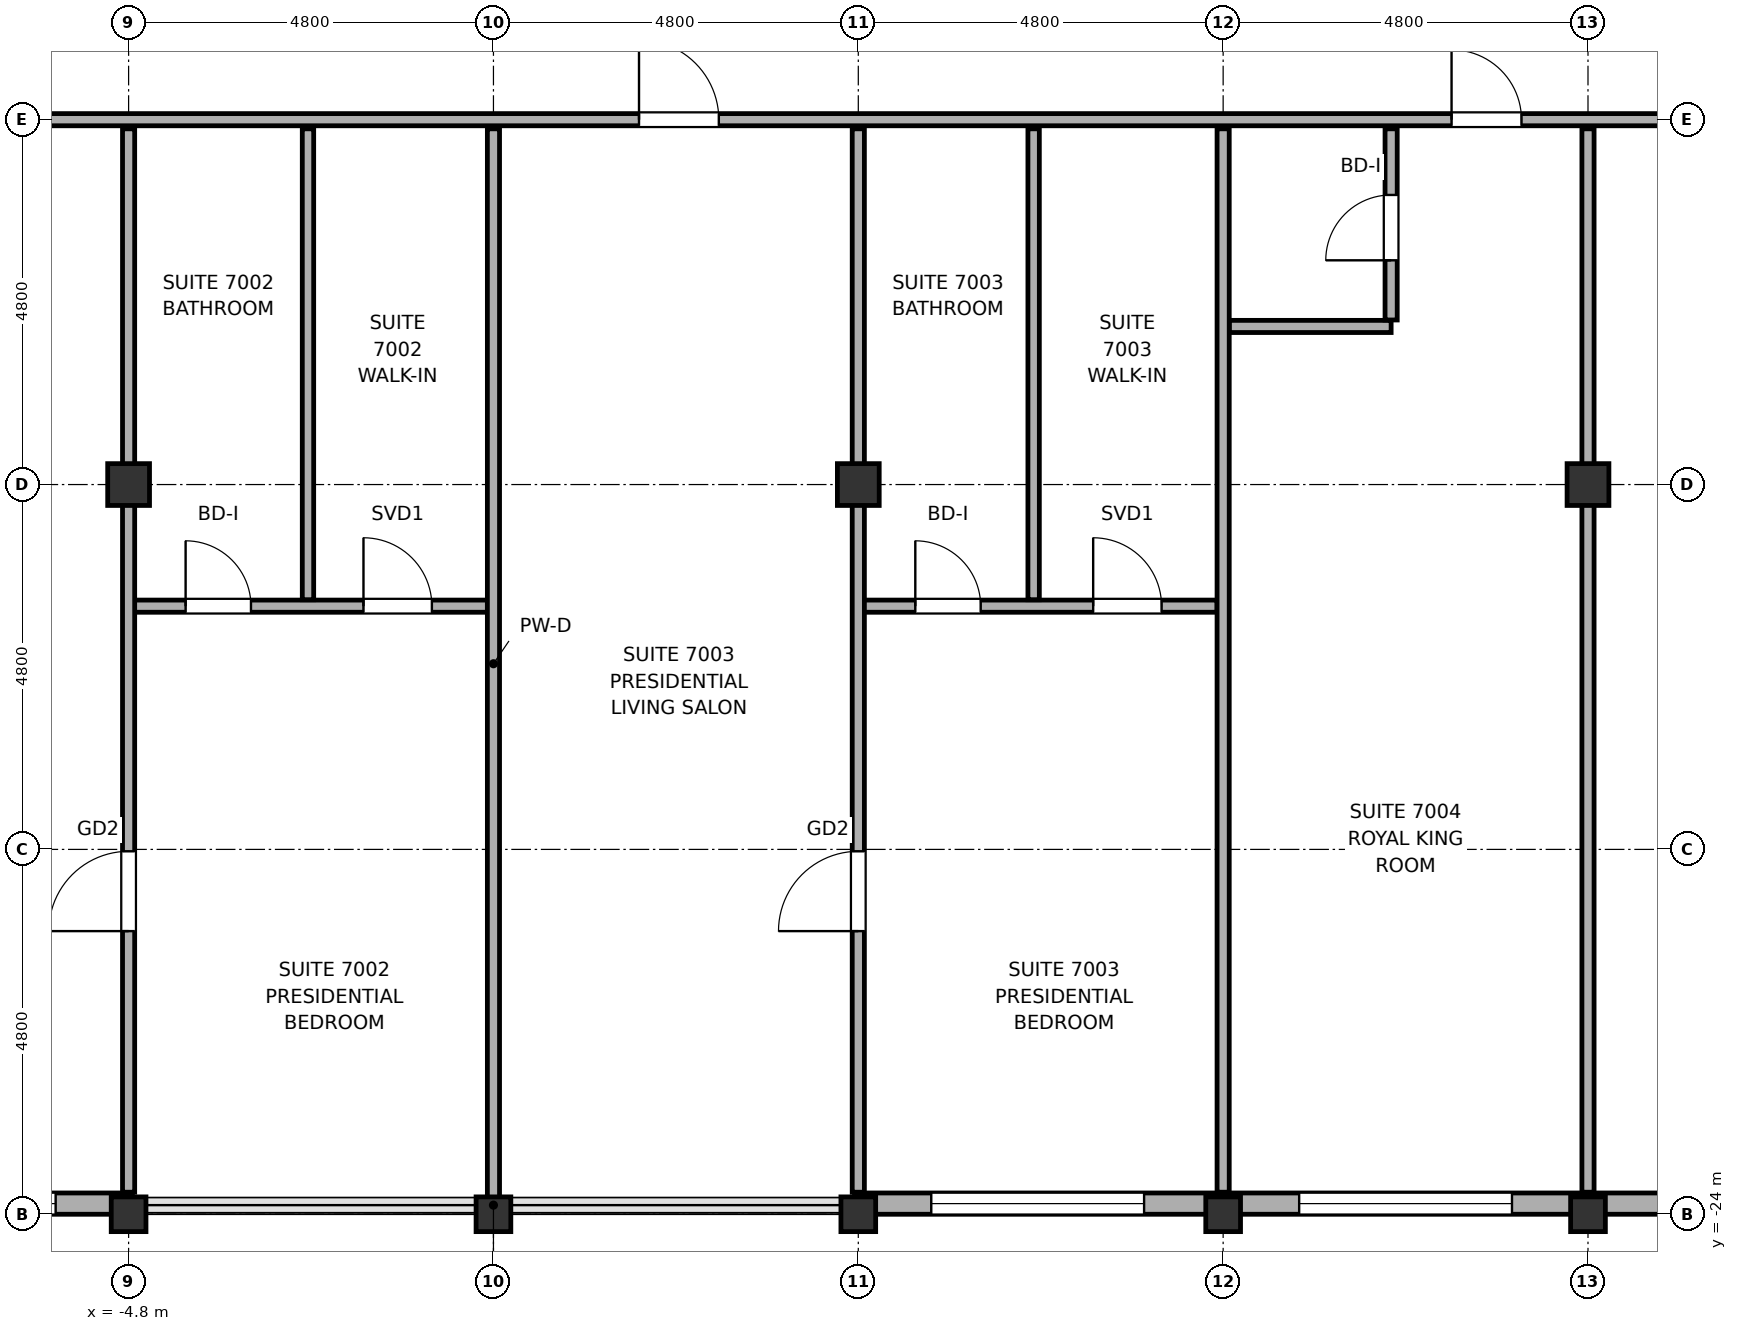
"""IFC4 building model, lengths in metres.
Left out: names, types, materials, properties, quantities, classifications, styles, units other than length and angle.
Written with IfcOpenShell. Run it as: python <this file> out.ifc"""

import sys

from ifc_helpers import new_model, si_unit, direction, frame, frame_2d, origin, origin_2d, place, context, subcontext, project, spatial, rectangle, hollow_rectangle, hollow_circle, extrude, element, fill, save


model = new_model("IFC4")
c1 = context("Model", 3, precision=1e-05, world=origin(), true_north=direction((0.0, 1.0)))
c2 = subcontext(c1, "Body", "Model", "MODEL_VIEW")
j1 = project(units=[si_unit("LENGTHUNIT", "METRE"), si_unit("PLANEANGLEUNIT", "RADIAN")], contexts=[c1])
p1 = place(None, origin())
s1 = spatial("IfcSite", under=j1, at=p1, CompositionType="ELEMENT")
p2 = place(p1, origin())
s2 = spatial("IfcBuilding", under=s1, at=p2, CompositionType="ELEMENT")
p3 = place(p2, frame((0.0, 0.0, 282.2)))
s3 = spatial("IfcBuildingStorey", under=s2, at=p3, CompositionType="ELEMENT", Elevation=282.2)
p4 = place(p3, frame((-4.8, -24.0, -0.2), z_axis=(0.0, 0.0, 1.0), x_axis=(1.0, 0.0, 0.0)))
e1 = element("IfcColumn", 1, at=p4, inside=s3, PredefinedType="COLUMN", context=c2, shape_type="SweptSolid", body=[
    extrude(hollow_circle(Radius=0.229, WallThickness=0.02, at=origin_2d()), origin(), (0.0, 0.0, 1.0), 4.4),
])
p5 = place(p3, frame((-4.8, -14.4, 0.0), z_axis=(0.0, 0.0, 1.0), x_axis=(1.0, 0.0, 0.0)))
e2 = element("IfcColumn", 2, at=p5, inside=s3, PredefinedType="COLUMN", context=c2, shape_type="SweptSolid", body=[
    extrude(hollow_rectangle(XDim=0.55, YDim=0.55, WallThickness=0.025, at=origin_2d()), origin(), (0.0, 0.0, 1.0), 4.2),
])
for number, where, z_axis, x_axis in (
    (3, (0.0, -24.0, -0.2), (0.0, 0.0, 1.0), (1.0, 0.0, 0.0)),
    (4, (4.8, -24.0, -0.2), (0.0, 0.0, 1.0), (1.0, 0.0, 0.0)),
):
    element("IfcColumn", number, at=place(p3, frame(where, z_axis=z_axis, x_axis=x_axis)), inside=s3, PredefinedType="COLUMN", context=c2, shape_type="SweptSolid", body=[
        extrude(hollow_circle(Radius=0.229, WallThickness=0.02, at=origin_2d()), origin(), (0.0, 0.0, 1.0), 4.4),
    ])
p6 = place(p3, frame((4.8, -14.4, 0.0), z_axis=(0.0, 0.0, 1.0), x_axis=(1.0, 0.0, 0.0)))
e5 = element("IfcColumn", 5, at=p6, inside=s3, PredefinedType="COLUMN", context=c2, shape_type="SweptSolid", body=[
    extrude(hollow_rectangle(XDim=0.55, YDim=0.55, WallThickness=0.025, at=origin_2d()), origin(), (0.0, 0.0, 1.0), 4.2),
])
for number, where, z_axis, x_axis in (
    (6, (9.6, -24.0, -0.2), (0.0, 0.0, 1.0), (1.0, 0.0, 0.0)),
    (7, (14.4, -24.0, -0.2), (0.0, 0.0, 1.0), (1.0, 0.0, 0.0)),
):
    element("IfcColumn", number, at=place(p3, frame(where, z_axis=z_axis, x_axis=x_axis)), inside=s3, PredefinedType="COLUMN", context=c2, shape_type="SweptSolid", body=[
        extrude(hollow_circle(Radius=0.229, WallThickness=0.02, at=origin_2d()), origin(), (0.0, 0.0, 1.0), 4.4),
    ])
p7 = place(p3, frame((14.4, -14.4, 0.0), z_axis=(0.0, 0.0, 1.0), x_axis=(1.0, 0.0, 0.0)))
e8 = element("IfcColumn", 8, at=p7, inside=s3, PredefinedType="COLUMN", context=c2, shape_type="SweptSolid", body=[
    extrude(hollow_rectangle(XDim=0.55, YDim=0.55, WallThickness=0.025, at=origin_2d()), origin(), (0.0, 0.0, 1.0), 4.2),
])
p8 = place(p3, frame((-25.2, -23.86, 0.0), z_axis=(0.0, 0.0, 1.0), x_axis=(1.0, 0.0, 0.0)))
e9 = element("IfcWall", 9, at=p8, inside=s3, PredefinedType="SOLIDWALL", context=c2, shape_type="SweptSolid", body=[
    extrude(rectangle(XDim=20.45, YDim=0.28, at=frame_2d((10.225, 0.0))), origin(), (0.0, 0.0, 1.0), 2.6),
])
p9 = place(p8, frame((7.04, 0.0, 0.75)))
e10 = element("IfcOpeningElement", 10, at=p9, cuts=e9, PredefinedType="OPENING", context=c2, shape_type="SweptSolid", body=[
    extrude(rectangle(XDim=2.8, YDim=1.7, at=frame_2d((1.4, 0.85))), frame((0.0, 0.155, 0.0), z_axis=(0.0, -1.0, 0.0), x_axis=(1.0, 0.0, 0.0)), (0.0, 0.0, 1.0), 0.31),
])
p10 = place(p8, frame((11.76, 0.0, 0.75)))
e11 = element("IfcOpeningElement", 11, at=p10, cuts=e9, PredefinedType="OPENING", context=c2, shape_type="SweptSolid", body=[
    extrude(rectangle(XDim=2.8, YDim=1.7, at=frame_2d((1.4, 0.85))), frame((0.0, 0.155, 0.0), z_axis=(0.0, -1.0, 0.0), x_axis=(1.0, 0.0, 0.0)), (0.0, 0.0, 1.0), 0.31),
])
p11 = place(p8, frame((16.64, 0.0, 0.75)))
e12 = element("IfcOpeningElement", 12, at=p11, cuts=e9, PredefinedType="OPENING", context=c2, shape_type="SweptSolid", body=[
    extrude(rectangle(XDim=2.8, YDim=1.7, at=frame_2d((1.4, 0.85))), frame((0.0, 0.155, 0.0), z_axis=(0.0, -1.0, 0.0), x_axis=(1.0, 0.0, 0.0)), (0.0, 0.0, 1.0), 0.31),
])
p12 = place(p3, frame((4.75, -23.86, 0.0), z_axis=(0.0, 0.0, 1.0), x_axis=(1.0, 0.0, 0.0)))
e13 = element("IfcWall", 13, at=p12, inside=s3, PredefinedType="SOLIDWALL", context=c2, shape_type="SweptSolid", body=[
    extrude(rectangle(XDim=15.65, YDim=0.28, at=frame_2d((7.825, 0.0))), origin(), (0.0, 0.0, 1.0), 2.6),
])
p13 = place(p12, frame((1.01, 0.0, 0.75)))
e14 = element("IfcOpeningElement", 14, at=p13, cuts=e13, PredefinedType="OPENING", context=c2, shape_type="SweptSolid", body=[
    extrude(rectangle(XDim=2.8, YDim=1.7, at=frame_2d((1.4, 0.85))), frame((0.0, 0.155, 0.0), z_axis=(0.0, -1.0, 0.0), x_axis=(1.0, 0.0, 0.0)), (0.0, 0.0, 1.0), 0.31),
])
p14 = place(p12, frame((5.85, 0.0, 0.75)))
e15 = element("IfcOpeningElement", 15, at=p14, cuts=e13, PredefinedType="OPENING", context=c2, shape_type="SweptSolid", body=[
    extrude(rectangle(XDim=2.8, YDim=1.7, at=frame_2d((1.4, 0.85))), frame((0.0, 0.155, 0.0), z_axis=(0.0, -1.0, 0.0), x_axis=(1.0, 0.0, 0.0)), (0.0, 0.0, 1.0), 0.31),
])
p15 = place(p3, frame((-4.8, -16.0, 0.0), z_axis=(0.0, 0.0, 1.0), x_axis=(1.0, 0.0, 0.0)))
e16 = element("IfcWall", 16, at=p15, inside=s3, PredefinedType="PARTITIONING", context=c2, shape_type="SweptSolid", body=[
    extrude(rectangle(XDim=4.72, YDim=0.16, at=frame_2d((2.36, 0.0))), origin(), (0.0, 0.0, 1.0), 3.56),
])
p16 = place(p15, frame((0.75, 0.0, 0.0)))
e17 = element("IfcOpeningElement", 17, at=p16, cuts=e16, PredefinedType="OPENING", context=c2, shape_type="SweptSolid", body=[
    extrude(rectangle(XDim=0.86, YDim=2.1, at=frame_2d((0.43, 1.05))), frame((0.0, 0.095, 0.0), z_axis=(0.0, -1.0, 0.0), x_axis=(1.0, 0.0, 0.0)), (0.0, 0.0, 1.0), 0.19),
])
p17 = place(p15, frame((3.09, 0.0, 0.0)))
e18 = element("IfcOpeningElement", 18, at=p17, cuts=e16, PredefinedType="OPENING", context=c2, shape_type="SweptSolid", body=[
    extrude(rectangle(XDim=0.9, YDim=2.1, at=frame_2d((0.45, 1.05))), frame((0.0, 0.095, 0.0), z_axis=(0.0, -1.0, 0.0), x_axis=(1.0, 0.0, 0.0)), (0.0, 0.0, 1.0), 0.19),
])
p18 = place(p3, frame((4.8, -16.0, 0.0), z_axis=(0.0, 0.0, 1.0), x_axis=(1.0, 0.0, 0.0)))
e19 = element("IfcWall", 19, at=p18, inside=s3, PredefinedType="PARTITIONING", context=c2, shape_type="SweptSolid", body=[
    extrude(rectangle(XDim=4.72, YDim=0.16, at=frame_2d((2.36, 0.0))), origin(), (0.0, 0.0, 1.0), 3.56),
])
p19 = place(p18, frame((0.75, 0.0, 0.0)))
e20 = element("IfcOpeningElement", 20, at=p19, cuts=e19, PredefinedType="OPENING", context=c2, shape_type="SweptSolid", body=[
    extrude(rectangle(XDim=0.86, YDim=2.1, at=frame_2d((0.43, 1.05))), frame((0.0, 0.095, 0.0), z_axis=(0.0, -1.0, 0.0), x_axis=(1.0, 0.0, 0.0)), (0.0, 0.0, 1.0), 0.19),
])
p20 = place(p18, frame((3.09, 0.0, 0.0)))
e21 = element("IfcOpeningElement", 21, at=p20, cuts=e19, PredefinedType="OPENING", context=c2, shape_type="SweptSolid", body=[
    extrude(rectangle(XDim=0.9, YDim=2.1, at=frame_2d((0.45, 1.05))), frame((0.0, 0.095, 0.0), z_axis=(0.0, -1.0, 0.0), x_axis=(1.0, 0.0, 0.0)), (0.0, 0.0, 1.0), 0.19),
])
p21 = place(p3, frame((9.68, -12.32, 0.0), z_axis=(0.0, 0.0, 1.0), x_axis=(1.0, 0.0, 0.0)))
e22 = element("IfcWall", 22, at=p21, inside=s3, PredefinedType="PARTITIONING", context=c2, shape_type="SweptSolid", body=[
    extrude(rectangle(XDim=2.13, YDim=0.16, at=frame_2d((1.065, 0.0))), origin(), (0.0, 0.0, 1.0), 3.64),
])
p22 = place(p3, frame((-28.51, -9.6, 0.0), z_axis=(0.0, 0.0, 1.0), x_axis=(1.0, 0.0, 0.0)))
e23 = element("IfcWall", 23, at=p22, inside=s3, PredefinedType="PARTITIONING", context=c2, shape_type="SweptSolid", body=[
    extrude(rectangle(XDim=52.22, YDim=0.16, at=frame_2d((26.11, 0.0))), origin(), (0.0, 0.0, 1.0), 3.56),
])
p23 = place(p22, frame((6.46, 0.0, 0.0)))
e24 = element("IfcOpeningElement", 24, at=p23, cuts=e23, PredefinedType="OPENING", context=c2, shape_type="SweptSolid", body=[
    extrude(rectangle(XDim=0.9, YDim=2.1, at=frame_2d((0.45, 1.05))), frame((0.0, 0.095, 0.0), z_axis=(0.0, -1.0, 0.0), x_axis=(1.0, 0.0, 0.0)), (0.0, 0.0, 1.0), 0.19),
])
p24 = place(p22, frame((44.86, 0.0, 0.0)))
e25 = element("IfcOpeningElement", 25, at=p24, cuts=e23, PredefinedType="OPENING", context=c2, shape_type="SweptSolid", body=[
    extrude(rectangle(XDim=0.9, YDim=2.1, at=frame_2d((0.45, 1.05))), frame((0.0, 0.095, 0.0), z_axis=(0.0, -1.0, 0.0), x_axis=(1.0, 0.0, 0.0)), (0.0, 0.0, 1.0), 0.19),
])
p25 = place(p22, frame((11.225, 0.0, 0.0)))
e26 = element("IfcOpeningElement", 26, at=p25, cuts=e23, PredefinedType="OPENING", context=c2, shape_type="SweptSolid", body=[
    extrude(rectangle(XDim=1.05, YDim=2.2, at=frame_2d((0.525, 1.1))), frame((0.0, 0.095, 0.0), z_axis=(0.0, -1.0, 0.0), x_axis=(1.0, 0.0, 0.0)), (0.0, 0.0, 1.0), 0.19),
])
p26 = place(p22, frame((20.825, 0.0, 0.0)))
e27 = element("IfcOpeningElement", 27, at=p26, cuts=e23, PredefinedType="OPENING", context=c2, shape_type="SweptSolid", body=[
    extrude(rectangle(XDim=1.05, YDim=2.2, at=frame_2d((0.525, 1.1))), frame((0.0, 0.095, 0.0), z_axis=(0.0, -1.0, 0.0), x_axis=(1.0, 0.0, 0.0)), (0.0, 0.0, 1.0), 0.19),
])
p27 = place(p22, frame((30.425, 0.0, 0.0)))
e28 = element("IfcOpeningElement", 28, at=p27, cuts=e23, PredefinedType="OPENING", context=c2, shape_type="SweptSolid", body=[
    extrude(rectangle(XDim=1.05, YDim=2.2, at=frame_2d((0.525, 1.1))), frame((0.0, 0.095, 0.0), z_axis=(0.0, -1.0, 0.0), x_axis=(1.0, 0.0, 0.0)), (0.0, 0.0, 1.0), 0.19),
])
p28 = place(p22, frame((41.115, 0.0, 0.0)))
e29 = element("IfcOpeningElement", 29, at=p28, cuts=e23, PredefinedType="OPENING", context=c2, shape_type="SweptSolid", body=[
    extrude(rectangle(XDim=0.92, YDim=2.15, at=frame_2d((0.46, 1.075))), frame((0.0, 0.095, 0.0), z_axis=(0.0, -1.0, 0.0), x_axis=(1.0, 0.0, 0.0)), (0.0, 0.0, 1.0), 0.19),
])
p29 = place(p3, frame((-4.8, -23.71, 0.0), z_axis=(0.0, 0.0, 1.0), x_axis=(0.0, 1.0, 0.0)))
e30 = element("IfcWall", 30, at=p29, inside=s3, PredefinedType="PARTITIONING", context=c2, shape_type="SweptSolid", body=[
    extrude(rectangle(XDim=13.99, YDim=0.16, at=frame_2d((6.995, 0.0))), origin(), (0.0, 0.0, 1.0), 2.6),
])
p30 = place(p29, frame((3.435, 0.0, 0.0)))
e31 = element("IfcOpeningElement", 31, at=p30, cuts=e30, PredefinedType="OPENING", context=c2, shape_type="SweptSolid", body=[
    extrude(rectangle(XDim=1.05, YDim=2.2, at=frame_2d((0.525, 1.1))), frame((0.0, 0.095, 0.0), z_axis=(0.0, -1.0, 0.0), x_axis=(1.0, 0.0, 0.0)), (0.0, 0.0, 1.0), 0.19),
])
p31 = place(p3, frame((-2.44, -15.915, 0.0), z_axis=(0.0, 0.0, 1.0), x_axis=(0.0, 1.0, 0.0)))
e32 = element("IfcWall", 32, at=p31, inside=s3, PredefinedType="PARTITIONING", context=c2, shape_type="SweptSolid", body=[
    extrude(rectangle(XDim=6.195, YDim=0.15, at=frame_2d((3.098, 0.0))), origin(), (0.0, 0.0, 1.0), 2.6),
])
p32 = place(p3, frame((0.0, -23.795, 0.0), z_axis=(0.0, 0.0, 1.0), x_axis=(0.0, 1.0, 0.0)))
e33 = element("IfcWall", 33, at=p32, inside=s3, PredefinedType="PARTITIONING", context=c2, shape_type="SweptSolid", body=[
    extrude(rectangle(XDim=14.075, YDim=0.16, at=frame_2d((7.038, 0.0))), origin(), (0.0, 0.0, 1.0), 2.6),
])
p33 = place(p3, frame((4.8, -23.71, 0.0), z_axis=(0.0, 0.0, 1.0), x_axis=(0.0, 1.0, 0.0)))
e34 = element("IfcWall", 34, at=p33, inside=s3, PredefinedType="PARTITIONING", context=c2, shape_type="SweptSolid", body=[
    extrude(rectangle(XDim=13.99, YDim=0.16, at=frame_2d((6.995, 0.0))), origin(), (0.0, 0.0, 1.0), 2.6),
])
p34 = place(p33, frame((3.435, 0.0, 0.0)))
e35 = element("IfcOpeningElement", 35, at=p34, cuts=e34, PredefinedType="OPENING", context=c2, shape_type="SweptSolid", body=[
    extrude(rectangle(XDim=1.05, YDim=2.2, at=frame_2d((0.525, 1.1))), frame((0.0, 0.095, 0.0), z_axis=(0.0, -1.0, 0.0), x_axis=(1.0, 0.0, 0.0)), (0.0, 0.0, 1.0), 0.19),
])
p35 = place(p3, frame((7.107, -15.915, 0.0), z_axis=(0.0, 0.0, 1.0), x_axis=(0.0, 1.0, 0.0)))
e36 = element("IfcWall", 36, at=p35, inside=s3, PredefinedType="PARTITIONING", context=c2, shape_type="SweptSolid", body=[
    extrude(rectangle(XDim=6.195, YDim=0.15, at=frame_2d((3.098, 0.0))), origin(), (0.0, 0.0, 1.0), 2.6),
])
p36 = place(p3, frame((9.6, -23.71, 0.0), z_axis=(0.0, 0.0, 1.0), x_axis=(0.0, 1.0, 0.0)))
e37 = element("IfcWall", 37, at=p36, inside=s3, PredefinedType="PARTITIONING", context=c2, shape_type="SweptSolid", body=[
    extrude(rectangle(XDim=13.99, YDim=0.16, at=frame_2d((6.995, 0.0))), origin(), (0.0, 0.0, 1.0), 2.6),
])
p37 = place(p3, frame((11.81, -12.235, 0.0), z_axis=(0.0, 0.0, 1.0), x_axis=(0.0, 1.0, 0.0)))
e38 = element("IfcWall", 38, at=p37, inside=s3, PredefinedType="PARTITIONING", context=c2, shape_type="SweptSolid", body=[
    extrude(rectangle(XDim=2.515, YDim=0.16, at=frame_2d((1.258, 0.0))), origin(), (0.0, 0.0, 1.0), 3.64),
])
p38 = place(p37, frame((0.785, 0.0, 0.0)))
e39 = element("IfcOpeningElement", 39, at=p38, cuts=e38, PredefinedType="OPENING", context=c2, shape_type="SweptSolid", body=[
    extrude(rectangle(XDim=0.86, YDim=2.1, at=frame_2d((0.43, 1.05))), frame((0.0, 0.095, 0.0), z_axis=(0.0, -1.0, 0.0), x_axis=(1.0, 0.0, 0.0)), (0.0, 0.0, 1.0), 0.19),
])
p39 = place(p3, frame((14.4, -23.71, 0.0), z_axis=(0.0, 0.0, 1.0), x_axis=(0.0, 1.0, 0.0)))
e40 = element("IfcWall", 40, at=p39, inside=s3, PredefinedType="PARTITIONING", context=c2, shape_type="SweptSolid", body=[
    extrude(rectangle(XDim=13.99, YDim=0.16, at=frame_2d((6.995, 0.0))), origin(), (0.0, 0.0, 1.0), 2.6),
])
p40 = place(p11, origin())
e41 = element("IfcWindow", 41, at=p40, inside=s3, PartitioningType="SINGLE_PANEL", PredefinedType="WINDOW", context=c2, shape_type="SweptSolid", body=[
    extrude(rectangle(XDim=2.8, YDim=1.7, at=frame_2d((1.4, 0.85))), frame((0.0, 0.03, 0.0), z_axis=(0.0, -1.0, 0.0), x_axis=(1.0, 0.0, 0.0)), (0.0, 0.0, 1.0), 0.06),
])
fill(e12, e41)
p41 = place(p13, origin())
e42 = element("IfcWindow", 42, at=p41, inside=s3, PartitioningType="SINGLE_PANEL", PredefinedType="WINDOW", context=c2, shape_type="SweptSolid", body=[
    extrude(rectangle(XDim=2.8, YDim=1.7, at=frame_2d((1.4, 0.85))), frame((0.0, 0.03, 0.0), z_axis=(0.0, -1.0, 0.0), x_axis=(1.0, 0.0, 0.0)), (0.0, 0.0, 1.0), 0.06),
])
fill(e14, e42)
p42 = place(p14, origin())
e43 = element("IfcWindow", 43, at=p42, inside=s3, PartitioningType="SINGLE_PANEL", PredefinedType="WINDOW", context=c2, shape_type="SweptSolid", body=[
    extrude(rectangle(XDim=2.8, YDim=1.7, at=frame_2d((1.4, 0.85))), frame((0.0, 0.03, 0.0), z_axis=(0.0, -1.0, 0.0), x_axis=(1.0, 0.0, 0.0)), (0.0, 0.0, 1.0), 0.06),
])
fill(e15, e43)
p43 = place(p30, origin())
e44 = element("IfcDoor", 44, at=p43, inside=s3, OperationType="SINGLE_SWING_RIGHT", PredefinedType="DOOR", context=c2, shape_type="SweptSolid", body=[
    extrude(rectangle(XDim=1.05, YDim=2.2, at=frame_2d((0.525, 1.1))), frame((0.0, 0.025, 0.0), z_axis=(0.0, -1.0, 0.0), x_axis=(1.0, 0.0, 0.0)), (0.0, 0.0, 1.0), 0.05),
])
fill(e31, e44)
p44 = place(p16, origin())
e45 = element("IfcDoor", 45, at=p44, inside=s3, OperationType="SINGLE_SWING_RIGHT", PredefinedType="DOOR", context=c2, shape_type="SweptSolid", body=[
    extrude(rectangle(XDim=0.86, YDim=2.1, at=frame_2d((0.43, 1.05))), frame((0.0, 0.025, 0.0), z_axis=(0.0, -1.0, 0.0), x_axis=(1.0, 0.0, 0.0)), (0.0, 0.0, 1.0), 0.05),
])
fill(e17, e45)
p45 = place(p17, origin())
e46 = element("IfcDoor", 46, at=p45, inside=s3, OperationType="SINGLE_SWING_RIGHT", PredefinedType="DOOR", context=c2, shape_type="SweptSolid", body=[
    extrude(rectangle(XDim=0.9, YDim=2.1, at=frame_2d((0.45, 1.05))), frame((0.0, 0.025, 0.0), z_axis=(0.0, -1.0, 0.0), x_axis=(1.0, 0.0, 0.0)), (0.0, 0.0, 1.0), 0.05),
])
fill(e18, e46)
p46 = place(p27, origin())
e47 = element("IfcDoor", 47, at=p46, inside=s3, OperationType="SINGLE_SWING_RIGHT", PredefinedType="DOOR", context=c2, shape_type="SweptSolid", body=[
    extrude(rectangle(XDim=1.05, YDim=2.2, at=frame_2d((0.525, 1.1))), frame((0.0, 0.025, 0.0), z_axis=(0.0, -1.0, 0.0), x_axis=(1.0, 0.0, 0.0)), (0.0, 0.0, 1.0), 0.05),
])
fill(e28, e47)
p47 = place(p34, origin())
e48 = element("IfcDoor", 48, at=p47, inside=s3, OperationType="SINGLE_SWING_LEFT", PredefinedType="DOOR", context=c2, shape_type="SweptSolid", body=[
    extrude(rectangle(XDim=1.05, YDim=2.2, at=frame_2d((0.525, 1.1))), frame((0.0, 0.025, 0.0), z_axis=(0.0, -1.0, 0.0), x_axis=(1.0, 0.0, 0.0)), (0.0, 0.0, 1.0), 0.05),
])
fill(e35, e48)
p48 = place(p19, origin())
e49 = element("IfcDoor", 49, at=p48, inside=s3, OperationType="SINGLE_SWING_RIGHT", PredefinedType="DOOR", context=c2, shape_type="SweptSolid", body=[
    extrude(rectangle(XDim=0.86, YDim=2.1, at=frame_2d((0.43, 1.05))), frame((0.0, 0.025, 0.0), z_axis=(0.0, -1.0, 0.0), x_axis=(1.0, 0.0, 0.0)), (0.0, 0.0, 1.0), 0.05),
])
fill(e20, e49)
p49 = place(p20, origin())
e50 = element("IfcDoor", 50, at=p49, inside=s3, OperationType="SINGLE_SWING_LEFT", PredefinedType="DOOR", context=c2, shape_type="SweptSolid", body=[
    extrude(rectangle(XDim=0.9, YDim=2.1, at=frame_2d((0.45, 1.05))), frame((0.0, 0.025, 0.0), z_axis=(0.0, -1.0, 0.0), x_axis=(1.0, 0.0, 0.0)), (0.0, 0.0, 1.0), 0.05),
])
fill(e21, e50)
p50 = place(p28, origin())
e51 = element("IfcDoor", 51, at=p50, inside=s3, OperationType="SINGLE_SWING_LEFT", PredefinedType="DOOR", context=c2, shape_type="SweptSolid", body=[
    extrude(rectangle(XDim=0.92, YDim=2.15, at=frame_2d((0.46, 1.075))), frame((0.0, 0.025, 0.0), z_axis=(0.0, -1.0, 0.0), x_axis=(1.0, 0.0, 0.0)), (0.0, 0.0, 1.0), 0.05),
])
fill(e29, e51)
p51 = place(p38, origin())
e52 = element("IfcDoor", 52, at=p51, inside=s3, OperationType="SINGLE_SWING_LEFT", PredefinedType="DOOR", context=c2, shape_type="SweptSolid", body=[
    extrude(rectangle(XDim=0.86, YDim=2.1, at=frame_2d((0.43, 1.05))), frame((0.0, 0.025, 0.0), z_axis=(0.0, -1.0, 0.0), x_axis=(1.0, 0.0, 0.0)), (0.0, 0.0, 1.0), 0.05),
])
fill(e39, e52)
save(model, sys.argv[1])
